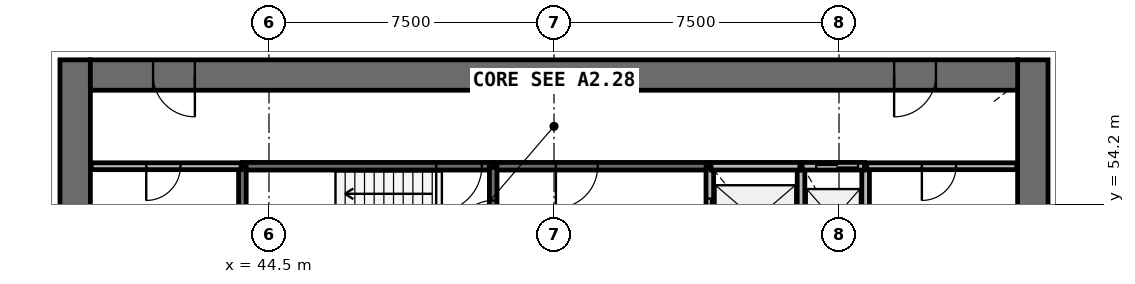
"""IFC4 building model, lengths in metres.
Left out: names, types, materials, properties, quantities, classifications, styles, units other than length and angle.
Written with IfcOpenShell. Run it as: python <this file> out.ifc"""

import sys

from ifc_helpers import new_model, si_unit, direction, frame, frame_2d, origin, place, context, subcontext, project, spatial, rectangle, extrude, source, transform, mapped, element, fill, save


model = new_model("IFC4")
c1 = context("Model", 3, precision=1e-05, world=origin(), true_north=direction((0.0, 1.0)))
c2 = subcontext(c1, "Body", "Model", "MODEL_VIEW")
j1 = project(units=[si_unit("LENGTHUNIT", "METRE"), si_unit("PLANEANGLEUNIT", "RADIAN")], contexts=[c1])
p1 = place(None, origin())
s1 = spatial("IfcSite", under=j1, at=p1, CompositionType="ELEMENT")
p2 = place(p1, origin())
s2 = spatial("IfcBuilding", under=s1, at=p2, CompositionType="ELEMENT")
p3 = place(p2, frame((0.0, 0.0, 116.7)))
s3 = spatial("IfcBuildingStorey", under=s2, at=p3, CompositionType="ELEMENT", Elevation=116.7)
p4 = place(p3, frame((64.6, 38.0, 0.0), z_axis=(0.0, 0.0, 1.0), x_axis=(0.0, 1.0, 0.0)))
e1 = element("IfcWall", 1, at=p4, inside=s3, PredefinedType="SHEAR", context=c2, shape_type="SweptSolid", body=[
    extrude(rectangle(XDim=20.0, YDim=0.8, at=frame_2d((10.0, 0.0))), origin(), (0.0, 0.0, 1.0), 4.1),
])
p5 = place(p4, frame((9.1, 0.0, 0.0)))
e2 = element("IfcOpeningElement", 2, at=p5, cuts=e1, PredefinedType="OPENING", context=c2, shape_type="SweptSolid", body=[
    extrude(rectangle(XDim=1.8, YDim=2.1, at=frame_2d((0.9, 1.05))), frame((0.0, 0.41, 0.0), z_axis=(0.0, -1.0, 0.0), x_axis=(1.0, 0.0, 0.0)), (0.0, 0.0, 1.0), 0.82),
])
p6 = place(p3, frame((39.4, 58.0, 0.0), z_axis=(0.0, 0.0, 1.0), x_axis=(0.0, -1.0, 0.0)))
e3 = element("IfcWall", 3, at=p6, inside=s3, PredefinedType="SHEAR", context=c2, shape_type="SweptSolid", body=[
    extrude(rectangle(XDim=20.0, YDim=0.8, at=frame_2d((10.0, 0.0))), origin(), (0.0, 0.0, 1.0), 4.1),
])
p7 = place(p6, frame((9.1, 0.0, 0.0)))
e4 = element("IfcOpeningElement", 4, at=p7, cuts=e3, PredefinedType="OPENING", context=c2, shape_type="SweptSolid", body=[
    extrude(rectangle(XDim=1.8, YDim=2.1, at=frame_2d((0.9, 1.05))), frame((0.0, 0.41, 0.0), z_axis=(0.0, -1.0, 0.0), x_axis=(1.0, 0.0, 0.0)), (0.0, 0.0, 1.0), 0.82),
])
p8 = place(p3, frame((64.2, 57.6, 0.0), z_axis=(0.0, 0.0, 1.0), x_axis=(-1.0, 0.0, 0.0)))
e5 = element("IfcWall", 5, at=p8, inside=s3, PredefinedType="SHEAR", context=c2, shape_type="SweptSolid", body=[
    extrude(rectangle(XDim=24.4, YDim=0.8, at=frame_2d((12.2, 0.0))), origin(), (0.0, 0.0, 1.0), 4.1),
])
p9 = place(p8, frame((21.65, 0.0, 0.0)))
e6 = element("IfcOpeningElement", 6, at=p9, cuts=e5, PredefinedType="OPENING", context=c2, shape_type="SweptSolid", body=[
    extrude(rectangle(XDim=1.1, YDim=2.1, at=frame_2d((0.55, 1.05))), frame((0.0, 0.41, 0.0), z_axis=(0.0, -1.0, 0.0), x_axis=(1.0, 0.0, 0.0)), (0.0, 0.0, 1.0), 0.82),
])
p10 = place(p8, frame((2.15, 0.0, 0.0)))
e7 = element("IfcOpeningElement", 7, at=p10, cuts=e5, PredefinedType="OPENING", context=c2, shape_type="SweptSolid", body=[
    extrude(rectangle(XDim=1.1, YDim=2.1, at=frame_2d((0.55, 1.05))), frame((0.0, 0.41, 0.0), z_axis=(0.0, -1.0, 0.0), x_axis=(1.0, 0.0, 0.0)), (0.0, 0.0, 1.0), 0.82),
])
p11 = place(p3, frame((50.4, 55.2, 0.0), z_axis=(0.0, 0.0, 1.0), x_axis=(-1.0, 0.0, 0.0)))
e8 = element("IfcWall", 8, at=p11, inside=s3, PredefinedType="SOLIDWALL", context=c2, shape_type="SweptSolid", body=[
    extrude(rectangle(XDim=6.6, YDim=0.2, at=frame_2d((3.3, 0.0))), origin(), (0.0, 0.0, 1.0), 3.7),
])
p12 = place(p11, frame((0.3, 0.0, 0.0)))
e9 = element("IfcOpeningElement", 9, at=p12, cuts=e8, PredefinedType="OPENING", context=c2, shape_type="SweptSolid", body=[
    extrude(rectangle(XDim=1.2, YDim=2.1, at=frame_2d((0.6, 1.05))), frame((0.0, 0.11, 0.0), z_axis=(0.0, -1.0, 0.0), x_axis=(1.0, 0.0, 0.0)), (0.0, 0.0, 1.0), 0.22),
])
p13 = place(p3, frame((56.1, 55.2, 0.0), z_axis=(0.0, 0.0, 1.0), x_axis=(-1.0, 0.0, 0.0)))
e10 = element("IfcWall", 10, at=p13, inside=s3, PredefinedType="SOLIDWALL", context=c2, shape_type="SweptSolid", body=[
    extrude(rectangle(XDim=5.67, YDim=0.2, at=frame_2d((2.835, 0.0))), origin(), (0.0, 0.0, 1.0), 3.7),
])
p14 = place(p13, frame((2.95, 0.0, 0.0)))
e11 = element("IfcOpeningElement", 11, at=p14, cuts=e10, PredefinedType="OPENING", context=c2, shape_type="SweptSolid", body=[
    extrude(rectangle(XDim=1.1, YDim=2.1, at=frame_2d((0.55, 1.05))), frame((0.0, 0.11, 0.0), z_axis=(0.0, -1.0, 0.0), x_axis=(1.0, 0.0, 0.0)), (0.0, 0.0, 1.0), 0.22),
])
p15 = place(p3, frame((50.4, 52.4, 0.0), z_axis=(0.0, 0.0, 1.0), x_axis=(0.0, 1.0, 0.0)))
e12 = element("IfcWall", 12, at=p15, inside=s3, PredefinedType="SOLIDWALL", context=c2, shape_type="SweptSolid", body=[
    extrude(rectangle(XDim=2.77, YDim=0.2, at=frame_2d((1.385, 0.0))), origin(), (0.0, 0.0, 1.0), 3.7),
])
p16 = place(p15, frame((0.9, 0.0, 0.0)))
e13 = element("IfcOpeningElement", 13, at=p16, cuts=e12, PredefinedType="OPENING", context=c2, shape_type="SweptSolid", body=[
    extrude(rectangle(XDim=1.0, YDim=2.1, at=frame_2d((0.5, 1.05))), frame((0.0, 0.11, 0.0), z_axis=(0.0, -1.0, 0.0), x_axis=(1.0, 0.0, 0.0)), (0.0, 0.0, 1.0), 0.22),
])
p17 = place(p3, frame((56.1, 55.17, 0.0), z_axis=(0.0, 0.0, 1.0), x_axis=(0.0, -1.0, 0.0)))
e14 = element("IfcWall", 14, at=p17, inside=s3, PredefinedType="SOLIDWALL", context=c2, shape_type="SweptSolid", body=[
    extrude(rectangle(XDim=2.77, YDim=0.2, at=frame_2d((1.385, 0.0))), origin(), (0.0, 0.0, 1.0), 3.7),
])
p18 = place(p17, frame((0.82, 0.0, 0.0)))
e15 = element("IfcOpeningElement", 15, at=p18, cuts=e14, PredefinedType="OPENING", context=c2, shape_type="SweptSolid", body=[
    extrude(rectangle(XDim=1.1, YDim=2.1, at=frame_2d((0.55, 1.05))), frame((0.0, 0.11, 0.0), z_axis=(0.0, -1.0, 0.0), x_axis=(1.0, 0.0, 0.0)), (0.0, 0.0, 1.0), 0.22),
])
for number, where, z_axis, x_axis in (
    (16, (58.5, 52.4, 0.0), (0.0, 0.0, 1.0), (0.0, 1.0, 0.0)),
    (17, (60.2, 52.4, 0.0), (0.0, 0.0, 1.0), (0.0, 1.0, 0.0)),
):
    element("IfcWall", number, at=place(p3, frame(where, z_axis=z_axis, x_axis=x_axis)), inside=s3, PredefinedType="SOLIDWALL", context=c2, shape_type="SweptSolid", body=[
        extrude(rectangle(XDim=2.8, YDim=0.2, at=frame_2d((1.4, 0.0))), origin(), (0.0, 0.0, 1.0), 3.7),
    ])
p19 = place(p3, frame((58.47, 55.2, 0.0), z_axis=(0.0, 0.0, 1.0), x_axis=(-1.0, 0.0, 0.0)))
e18 = element("IfcWall", 18, at=p19, inside=s3, PredefinedType="SOLIDWALL", context=c2, shape_type="SweptSolid", body=[
    extrude(rectangle(XDim=2.34, YDim=0.2, at=frame_2d((1.17, 0.0))), origin(), (0.0, 0.0, 1.0), 3.7),
])
p20 = place(p3, frame((43.8, 55.17, 0.0), z_axis=(0.0, 0.0, 1.0), x_axis=(0.0, -1.0, 0.0)))
e19 = element("IfcWall", 19, at=p20, inside=s3, PredefinedType="SOLIDWALL", context=c2, shape_type="SweptSolid", body=[
    extrude(rectangle(XDim=2.14, YDim=0.2, at=frame_2d((1.07, 0.0))), origin(), (0.0, 0.0, 1.0), 3.7),
])
p21 = place(p3, frame((60.17, 55.2, 0.0), z_axis=(0.0, 0.0, 1.0), x_axis=(-1.0, 0.0, 0.0)))
e20 = element("IfcWall", 20, at=p21, inside=s3, PredefinedType="SOLIDWALL", context=c2, shape_type="SweptSolid", body=[
    extrude(rectangle(XDim=1.64, YDim=0.2, at=frame_2d((0.82, 0.0))), origin(), (0.0, 0.0, 1.0), 3.7),
])
p22 = place(p21, frame((0.17, 0.0, 0.0)))
e21 = element("IfcOpeningElement", 21, at=p22, cuts=e20, PredefinedType="OPENING", context=c2, shape_type="SweptSolid", body=[
    extrude(rectangle(XDim=1.1, YDim=2.1, at=frame_2d((0.55, 1.05))), frame((0.0, 0.11, 0.0), z_axis=(0.0, -1.0, 0.0), x_axis=(1.0, 0.0, 0.0)), (0.0, 0.0, 1.0), 0.22),
])
p23 = place(p3, frame((64.18, 55.2, 0.0), z_axis=(0.0, 0.0, 1.0), x_axis=(-1.0, 0.0, 0.0)))
e22 = element("IfcWall", 22, at=p23, inside=s3, PredefinedType="PARTITIONING", context=c2, shape_type="SweptSolid", body=[
    extrude(rectangle(XDim=3.95, YDim=0.18, at=frame_2d((1.975, 0.0))), origin(), (0.0, 0.0, 1.0), 3.7),
])
p24 = place(p23, frame((1.6, 0.0, 0.0)))
e23 = element("IfcOpeningElement", 23, at=p24, cuts=e22, PredefinedType="OPENING", context=c2, shape_type="SweptSolid", body=[
    extrude(rectangle(XDim=0.9, YDim=2.1, at=frame_2d((0.45, 1.05))), frame((0.0, 0.1, 0.0), z_axis=(0.0, -1.0, 0.0), x_axis=(1.0, 0.0, 0.0)), (0.0, 0.0, 1.0), 0.2),
])
p25 = place(p3, frame((43.77, 55.2, 0.0), z_axis=(0.0, 0.0, 1.0), x_axis=(-1.0, 0.0, 0.0)))
e24 = element("IfcWall", 24, at=p25, inside=s3, PredefinedType="PARTITIONING", context=c2, shape_type="SweptSolid", body=[
    extrude(rectangle(XDim=3.95, YDim=0.18, at=frame_2d((1.975, 0.0))), origin(), (0.0, 0.0, 1.0), 3.7),
])
p26 = place(p25, frame((1.6, 0.0, 0.0)))
e25 = element("IfcOpeningElement", 25, at=p26, cuts=e24, PredefinedType="OPENING", context=c2, shape_type="SweptSolid", body=[
    extrude(rectangle(XDim=0.9, YDim=2.1, at=frame_2d((0.45, 1.05))), frame((0.0, 0.1, 0.0), z_axis=(0.0, -1.0, 0.0), x_axis=(1.0, 0.0, 0.0)), (0.0, 0.0, 1.0), 0.2),
])
m1 = source(origin(), c2, "Body", "SweptSolid", [
    extrude(rectangle(XDim=1.1, YDim=2.1, at=frame_2d((0.55, 1.05))), frame((0.0, 0.025, 0.0), z_axis=(0.0, -1.0, 0.0), x_axis=(1.0, 0.0, 0.0)), (0.0, 0.0, 1.0), 0.05),
])
p27 = place(p18, origin())
e26 = element("IfcDoor", 26, at=p27, inside=s3, OperationType="DOUBLE_DOOR_SLIDING", PredefinedType="USERDEFINED", context=c2, shape_type="MappedRepresentation", body=[
    mapped(m1, transform((0.0, 0.0, 0.0), scale=1.0)),
])
fill(e15, e26)
p28 = place(p22, origin())
e27 = element("IfcDoor", 27, at=p28, inside=s3, OperationType="DOUBLE_DOOR_SLIDING", PredefinedType="USERDEFINED", context=c2, shape_type="MappedRepresentation", body=[
    mapped(m1, transform((0.0, 0.0, 0.0), scale=1.0)),
])
fill(e21, e27)
m2 = source(origin(), c2, "Body", "SweptSolid", [
    extrude(rectangle(XDim=1.2, YDim=2.1, at=frame_2d((0.6, 1.05))), frame((0.0, 0.025, 0.0), z_axis=(0.0, -1.0, 0.0), x_axis=(1.0, 0.0, 0.0)), (0.0, 0.0, 1.0), 0.05),
])
p29 = place(p12, origin())
e28 = element("IfcDoor", 28, at=p29, inside=s3, OperationType="SINGLE_SWING_RIGHT", PredefinedType="DOOR", context=c2, shape_type="MappedRepresentation", body=[
    mapped(m2, transform((0.0, 0.0, 0.0), scale=1.0)),
])
fill(e9, e28)
m3 = source(origin(), c2, "Body", "SweptSolid", [
    extrude(rectangle(XDim=1.0, YDim=2.1, at=frame_2d((0.5, 1.05))), frame((0.0, 0.025, 0.0), z_axis=(0.0, -1.0, 0.0), x_axis=(1.0, 0.0, 0.0)), (0.0, 0.0, 1.0), 0.05),
])
p30 = place(p16, origin())
e29 = element("IfcDoor", 29, at=p30, inside=s3, OperationType="SINGLE_SWING_LEFT", PredefinedType="DOOR", context=c2, shape_type="MappedRepresentation", body=[
    mapped(m3, transform((0.0, 0.0, 0.0), scale=1.0)),
])
fill(e13, e29)
m4 = source(origin(), c2, "Body", "SweptSolid", [
    extrude(rectangle(XDim=1.1, YDim=2.1, at=frame_2d((0.55, 1.05))), frame((0.0, 0.025, 0.0), z_axis=(0.0, -1.0, 0.0), x_axis=(1.0, 0.0, 0.0)), (0.0, 0.0, 1.0), 0.05),
])
p31 = place(p14, origin())
e30 = element("IfcDoor", 30, at=p31, inside=s3, OperationType="SINGLE_SWING_RIGHT", PredefinedType="DOOR", context=c2, shape_type="MappedRepresentation", body=[
    mapped(m4, transform((0.0, 0.0, 0.0), scale=1.0)),
])
fill(e11, e30)
m5 = source(origin(), c2, "Body", "SweptSolid", [
    extrude(rectangle(XDim=1.1, YDim=2.1, at=frame_2d((0.55, 1.05))), frame((0.0, 0.025, 0.0), z_axis=(0.0, -1.0, 0.0), x_axis=(1.0, 0.0, 0.0)), (0.0, 0.0, 1.0), 0.05),
])
p32 = place(p9, origin())
e31 = element("IfcDoor", 31, at=p32, inside=s3, OperationType="SINGLE_SWING_LEFT", PredefinedType="DOOR", context=c2, shape_type="MappedRepresentation", body=[
    mapped(m5, transform((0.0, 0.0, 0.0), scale=1.0)),
])
fill(e6, e31)
p33 = place(p10, origin())
e32 = element("IfcDoor", 32, at=p33, inside=s3, OperationType="SINGLE_SWING_RIGHT", PredefinedType="DOOR", context=c2, shape_type="MappedRepresentation", body=[
    mapped(m5, transform((0.0, 0.0, 0.0), scale=1.0)),
])
fill(e7, e32)
m6 = source(origin(), c2, "Body", "SweptSolid", [
    extrude(rectangle(XDim=0.9, YDim=2.1, at=frame_2d((0.45, 1.05))), frame((0.0, 0.025, 0.0), z_axis=(0.0, -1.0, 0.0), x_axis=(1.0, 0.0, 0.0)), (0.0, 0.0, 1.0), 0.05),
])
p34 = place(p26, origin())
e33 = element("IfcDoor", 33, at=p34, inside=s3, OperationType="SINGLE_SWING_RIGHT", PredefinedType="DOOR", context=c2, shape_type="MappedRepresentation", body=[
    mapped(m6, transform((0.0, 0.0, 0.0), scale=1.0)),
])
fill(e25, e33)
p35 = place(p24, origin())
e34 = element("IfcDoor", 34, at=p35, inside=s3, OperationType="SINGLE_SWING_RIGHT", PredefinedType="DOOR", context=c2, shape_type="MappedRepresentation", body=[
    mapped(m6, transform((0.0, 0.0, 0.0), scale=1.0)),
])
fill(e23, e34)
save(model, sys.argv[1])
